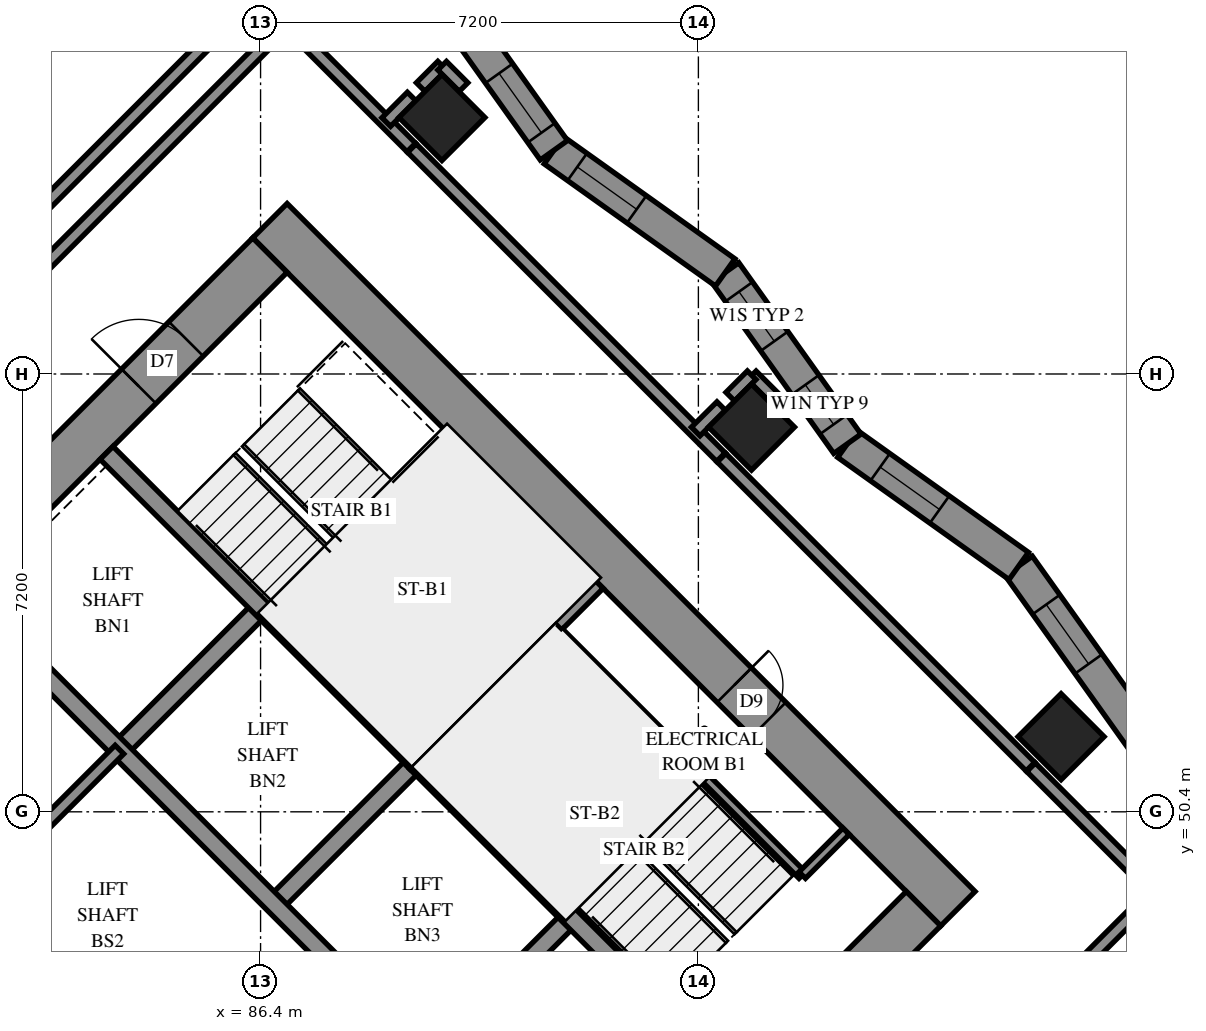
"""IFC4 building model, lengths in metres.
Left out: names, types, materials, properties, quantities, classifications, styles, units other than length and angle.
Written with IfcOpenShell. Run it as: python <this file> out.ifc"""

import sys

from ifc_helpers import new_model, si_unit, direction, frame, frame_2d, origin, origin_2d, place, context, subcontext, project, spatial, polyline, rectangle, outline, extrude, element, fill, save


model = new_model("IFC4")
c1 = context("Model", 3, precision=1e-05, world=origin(), true_north=direction((0.0, 1.0)))
c2 = subcontext(c1, "Body", "Model", "MODEL_VIEW")
j1 = project(units=[si_unit("LENGTHUNIT", "METRE"), si_unit("PLANEANGLEUNIT", "RADIAN")], contexts=[c1])
p1 = place(None, origin())
s1 = spatial("IfcSite", under=j1, at=p1, CompositionType="ELEMENT")
p2 = place(p1, origin())
s2 = spatial("IfcBuilding", under=s1, at=p2, CompositionType="ELEMENT")
p3 = place(p2, frame((0.0, 0.0, 111.8)))
s3 = spatial("IfcBuildingStorey", under=s2, at=p3, CompositionType="ELEMENT", Elevation=111.8)
for number, where, z_axis, x_axis in (
    (1, (89.382, 61.818, 0.0), (0.0, 0.0, 1.0), (0.707, -0.707, 0.0)),
    (2, (94.474, 56.727, 0.0), (0.0, 0.0, 1.0), (0.707, -0.707, 0.0)),
    (3, (99.565, 51.635, 0.0), (0.0, 0.0, 1.0), (0.707, -0.707, 0.0)),
):
    element("IfcColumn", number, at=place(p3, frame(where, z_axis=z_axis, x_axis=x_axis)), inside=s3, PredefinedType="COLUMN", context=c2, shape_type="SweptSolid", body=[
        extrude(rectangle(XDim=1.0, YDim=1.0, at=origin_2d()), origin(), (0.0, 0.0, 1.0), 3.1),
    ])
p4 = place(p3, frame((75.806, 49.373, -0.3), z_axis=(0.0, 0.0, 1.0), x_axis=(0.7071067812, -0.7071067812, 0.0)))
e4 = element("IfcWall", 4, at=p4, inside=s3, PredefinedType="SHEAR", context=c2, shape_type="SweptSolid", body=[
    extrude(rectangle(XDim=16.0, YDim=0.8, at=frame_2d((8.0, 0.0))), origin(), (0.0, 0.0, 1.0), 2.7),
])
p5 = place(p3, frame((86.554, 60.121, -0.3), z_axis=(0.0, 0.0, 1.0), x_axis=(0.7071067812, -0.7071067812, 0.0)))
e5 = element("IfcWall", 5, at=p5, inside=s3, PredefinedType="SHEAR", context=c2, shape_type="SweptSolid", body=[
    extrude(rectangle(XDim=16.0, YDim=0.8, at=frame_2d((8.0, 0.0))), origin(), (0.0, 0.0, 1.0), 2.7),
])
p6 = place(p5, frame((10.8, 0.0, 0.3)))
e6 = element("IfcOpeningElement", 6, at=p6, cuts=e5, PredefinedType="OPENING", context=c2, shape_type="SweptSolid", body=[
    extrude(rectangle(XDim=0.8, YDim=2.1, at=frame_2d((0.4, 1.05))), frame((0.0, 0.41, 0.0), z_axis=(0.0, -1.0, 0.0), x_axis=(1.0, 0.0, 0.0)), (0.0, 0.0, 1.0), 0.82),
])
p7 = place(p3, frame((76.372, 49.373, -0.3), z_axis=(0.0, 0.0, 1.0), x_axis=(0.7071067812, 0.7071067812, 0.0)))
e7 = element("IfcWall", 7, at=p7, inside=s3, PredefinedType="SHEAR", context=c2, shape_type="SweptSolid", body=[
    extrude(rectangle(XDim=14.4, YDim=0.8, at=frame_2d((7.2, 0.0))), origin(), (0.0, 0.0, 1.0), 2.7),
])
p8 = place(p7, frame((4.55, 0.0, 0.3)))
e8 = element("IfcOpeningElement", 8, at=p8, cuts=e7, PredefinedType="OPENING", context=c2, shape_type="SweptSolid", body=[
    extrude(rectangle(XDim=1.1, YDim=2.1, at=frame_2d((0.55, 1.05))), frame((0.0, 0.41, 0.0), z_axis=(0.0, -1.0, 0.0), x_axis=(1.0, 0.0, 0.0)), (0.0, 0.0, 1.0), 0.82),
])
p9 = place(p7, frame((11.35, 0.0, 0.3)))
e9 = element("IfcOpeningElement", 9, at=p9, cuts=e7, PredefinedType="OPENING", context=c2, shape_type="SweptSolid", body=[
    extrude(rectangle(XDim=1.1, YDim=2.1, at=frame_2d((0.55, 1.05))), frame((0.0, 0.41, 0.0), z_axis=(0.0, -1.0, 0.0), x_axis=(1.0, 0.0, 0.0)), (0.0, 0.0, 1.0), 0.82),
])
p10 = place(p3, frame((87.12, 38.625, -0.3), z_axis=(0.0, 0.0, 1.0), x_axis=(0.7071067812, 0.7071067812, 0.0)))
e10 = element("IfcWall", 10, at=p10, inside=s3, PredefinedType="SHEAR", context=c2, shape_type="SweptSolid", body=[
    extrude(rectangle(XDim=14.4, YDim=0.8, at=frame_2d((7.2, 0.0))), origin(), (0.0, 0.0, 1.0), 2.7),
])
p11 = place(p10, frame((4.55, 0.0, 0.3)))
e11 = element("IfcOpeningElement", 11, at=p11, cuts=e10, PredefinedType="OPENING", context=c2, shape_type="SweptSolid", body=[
    extrude(rectangle(XDim=1.1, YDim=2.1, at=frame_2d((0.55, 1.05))), frame((0.0, 0.41, 0.0), z_axis=(0.0, -1.0, 0.0), x_axis=(1.0, 0.0, 0.0)), (0.0, 0.0, 1.0), 0.82),
])
p12 = place(p10, frame((11.35, 0.0, 0.3)))
e12 = element("IfcOpeningElement", 12, at=p12, cuts=e10, PredefinedType="OPENING", context=c2, shape_type="SweptSolid", body=[
    extrude(rectangle(XDim=1.1, YDim=2.1, at=frame_2d((0.55, 1.05))), frame((0.0, 0.41, 0.0), z_axis=(0.0, -1.0, 0.0), x_axis=(1.0, 0.0, 0.0)), (0.0, 0.0, 1.0), 0.82),
])
p13 = place(p3, frame((84.079, 51.423, 0.0), z_axis=(0.0, 0.0, 1.0), x_axis=(0.7071219326, 0.7070916295, 0.0)))
e13 = element("IfcWall", 13, at=p13, inside=s3, PredefinedType="SOLIDWALL", context=c2, shape_type="SweptSolid", body=[
    extrude(rectangle(XDim=3.3, YDim=0.3, at=frame_2d((1.65, 0.0))), origin(), (0.0, 0.0, 1.0), 3.1),
])
for number, where, z_axis, x_axis in (
    (14, (86.625, 48.878, 0.0), (0.0, 0.0, 1.0), (0.707, 0.707, 0.0)),
    (15, (89.17, 46.332, 0.0), (0.0, 0.0, 1.0), (0.707, 0.707, 0.0)),
):
    element("IfcWall", number, at=place(p3, frame(where, z_axis=z_axis, x_axis=x_axis)), inside=s3, PredefinedType="SOLIDWALL", context=c2, shape_type="SweptSolid", body=[
        extrude(rectangle(XDim=3.3, YDim=0.3, at=frame_2d((1.65, 0.0))), origin(), (0.0, 0.0, 1.0), 3.1),
    ])
p14 = place(p3, frame((78.988, 51.423, 0.0), z_axis=(0.0, 0.0, 1.0), x_axis=(0.7071067812, -0.7071067812, 0.0)))
e16 = element("IfcWall", 16, at=p14, inside=s3, PredefinedType="SOLIDWALL", context=c2, shape_type="SweptSolid", body=[
    extrude(rectangle(XDim=14.4, YDim=0.3, at=frame_2d((7.2, 0.0))), origin(), (0.0, 0.0, 1.0), 3.1),
])
p15 = place(p14, frame((1.25, 0.0, 0.0)))
e17 = element("IfcOpeningElement", 17, at=p15, cuts=e16, PredefinedType="OPENING", context=c2, shape_type="SweptSolid", body=[
    extrude(rectangle(XDim=1.1, YDim=2.1, at=frame_2d((0.55, 1.05))), frame((0.0, 0.16, 0.0), z_axis=(0.0, -1.0, 0.0), x_axis=(1.0, 0.0, 0.0)), (0.0, 0.0, 1.0), 0.32),
])
p16 = place(p14, frame((4.85, 0.0, 0.0)))
e18 = element("IfcOpeningElement", 18, at=p16, cuts=e16, PredefinedType="OPENING", context=c2, shape_type="SweptSolid", body=[
    extrude(rectangle(XDim=1.1, YDim=2.1, at=frame_2d((0.55, 1.05))), frame((0.0, 0.16, 0.0), z_axis=(0.0, -1.0, 0.0), x_axis=(1.0, 0.0, 0.0)), (0.0, 0.0, 1.0), 0.32),
])
p17 = place(p14, frame((8.45, 0.0, 0.0)))
e19 = element("IfcOpeningElement", 19, at=p17, cuts=e16, PredefinedType="OPENING", context=c2, shape_type="SweptSolid", body=[
    extrude(rectangle(XDim=1.1, YDim=2.1, at=frame_2d((0.55, 1.05))), frame((0.0, 0.16, 0.0), z_axis=(0.0, -1.0, 0.0), x_axis=(1.0, 0.0, 0.0)), (0.0, 0.0, 1.0), 0.32),
])
p18 = place(p14, frame((12.05, 0.0, 0.0)))
e20 = element("IfcOpeningElement", 20, at=p18, cuts=e16, PredefinedType="OPENING", context=c2, shape_type="SweptSolid", body=[
    extrude(rectangle(XDim=1.1, YDim=2.1, at=frame_2d((0.55, 1.05))), frame((0.0, 0.16, 0.0), z_axis=(0.0, -1.0, 0.0), x_axis=(1.0, 0.0, 0.0)), (0.0, 0.0, 1.0), 0.32),
])
p19 = place(p3, frame((81.534, 53.969, 0.0), z_axis=(0.0, 0.0, 1.0), x_axis=(0.707103309, -0.7071102534, 0.0)))
e21 = element("IfcWall", 21, at=p19, inside=s3, PredefinedType="SOLIDWALL", context=c2, shape_type="SweptSolid", body=[
    extrude(rectangle(XDim=14.4, YDim=0.3, at=frame_2d((7.2, 0.0))), origin(), (0.0, 0.0, 1.0), 3.1),
])
p20 = place(p19, frame((12.05, 0.0, 0.0)))
e22 = element("IfcOpeningElement", 22, at=p20, cuts=e21, PredefinedType="OPENING", context=c2, shape_type="SweptSolid", body=[
    extrude(rectangle(XDim=1.1, YDim=2.1, at=frame_2d((0.55, 1.05))), frame((0.0, 0.16, 0.0), z_axis=(0.0, -1.0, 0.0), x_axis=(1.0, 0.0, 0.0)), (0.0, 0.0, 1.0), 0.32),
])
for number, where, z_axis, x_axis in (
    (23, (83.867, 56.302, 0.0), (0.0, 0.0, 1.0), (0.707, -0.707, 0.0)),
    (24, (88.958, 51.211, 0.0), (0.0, 0.0, 1.0), (0.707, -0.707, 0.0)),
):
    element("IfcWall", number, at=place(p3, frame(where, z_axis=z_axis, x_axis=x_axis)), inside=s3, PredefinedType="SOLIDWALL", context=c2, shape_type="SweptSolid", body=[
        extrude(rectangle(XDim=7.2, YDim=0.3, at=frame_2d((3.6, 0.0))), origin(), (0.0, 0.0, 1.0), 3.1),
    ])
p21 = place(p3, frame((88.958, 51.211, 0.0), z_axis=(0.0, 0.0, 1.0), x_axis=(0.7071067812, 0.7071067812, 0.0)))
e25 = element("IfcWall", 25, at=p21, inside=s3, PredefinedType="SOLIDWALL", context=c2, shape_type="SweptSolid", body=[
    extrude(rectangle(XDim=4.2, YDim=0.3, at=frame_2d((2.1, 0.0))), origin(), (0.0, 0.0, 1.0), 3.1),
])
p22 = place(p3, frame((100.877, 51.626, 0.0), z_axis=(0.0, 0.0, 1.0), x_axis=(-0.5805272785, 0.8142407991, 0.0)))
e26 = element("IfcWall", 26, at=p22, inside=s3, PredefinedType="SOLIDWALL", context=c2, shape_type="SweptSolid", body=[
    extrude(outline(polyline([(0.046, -0.275), (3.507, -0.275), (3.414, 0.275), (-0.046, 0.275), (0.046, -0.275)])), origin(), (0.0, 0.0, 1.0), 3.1),
])
p23 = place(p22, frame((1.481, 0.0, 0.5)))
e27 = element("IfcOpeningElement", 27, at=p23, cuts=e26, PredefinedType="OPENING", context=c2, shape_type="SweptSolid", body=[
    extrude(rectangle(XDim=1.2, YDim=2.45, at=frame_2d((0.6, 1.225))), frame((0.0, 0.285, 0.0), z_axis=(0.0, -1.0, 0.0), x_axis=(1.0, 0.0, 0.0)), (0.0, 0.0, 1.0), 0.57),
])
p24 = place(p3, frame((98.868, 54.444, 0.0), z_axis=(0.0, 0.0, 1.0), x_axis=(-0.8142544581, 0.5805081201, 0.0)))
e28 = element("IfcWall", 28, at=p24, inside=s3, PredefinedType="SOLIDWALL", context=c2, shape_type="SweptSolid", body=[
    extrude(outline(polyline([(-0.046, -0.275), (3.414, -0.275), (3.507, 0.275), (0.046, 0.275), (-0.046, -0.275)])), origin(), (0.0, 0.0, 1.0), 3.1),
])
p25 = place(p24, frame((1.599, 0.0, 0.5)))
e29 = element("IfcOpeningElement", 29, at=p25, cuts=e28, PredefinedType="OPENING", context=c2, shape_type="SweptSolid", body=[
    extrude(rectangle(XDim=1.2, YDim=2.45, at=frame_2d((0.6, 1.225))), frame((0.0, 0.285, 0.0), z_axis=(0.0, -1.0, 0.0), x_axis=(1.0, 0.0, 0.0)), (0.0, 0.0, 1.0), 0.57),
])
p26 = place(p3, frame((96.05, 56.452, 0.0), z_axis=(0.0, 0.0, 1.0), x_axis=(-0.5804944614, 0.8142641957, 0.0)))
e30 = element("IfcWall", 30, at=p26, inside=s3, PredefinedType="SOLIDWALL", context=c2, shape_type="SweptSolid", body=[
    extrude(outline(polyline([(0.046, -0.275), (3.507, -0.275), (3.414, 0.275), (-0.046, 0.275), (0.046, -0.275)])), origin(), (0.0, 0.0, 1.0), 3.1),
])
p27 = place(p26, frame((0.391, 0.0, 0.45)))
e31 = element("IfcOpeningElement", 31, at=p27, cuts=e30, PredefinedType="OPENING", context=c2, shape_type="SweptSolid", body=[
    extrude(rectangle(XDim=0.8, YDim=2.5, at=frame_2d((0.4, 1.25))), frame((0.0, 0.285, 0.0), z_axis=(0.0, -1.0, 0.0), x_axis=(1.0, 0.0, 0.0)), (0.0, 0.0, 1.0), 0.57),
])
p28 = place(p26, frame((2.071, 0.0, 0.45)))
e32 = element("IfcOpeningElement", 32, at=p28, cuts=e30, PredefinedType="OPENING", context=c2, shape_type="SweptSolid", body=[
    extrude(rectangle(XDim=1.0, YDim=2.5, at=frame_2d((0.5, 1.25))), frame((0.0, 0.285, 0.0), z_axis=(0.0, -1.0, 0.0), x_axis=(1.0, 0.0, 0.0)), (0.0, 0.0, 1.0), 0.57),
])
p29 = place(p3, frame((94.041, 59.27, 0.0), z_axis=(0.0, 0.0, 1.0), x_axis=(-0.8142641957, 0.5804944614, 0.0)))
e33 = element("IfcWall", 33, at=p29, inside=s3, PredefinedType="SOLIDWALL", context=c2, shape_type="SweptSolid", body=[
    extrude(outline(polyline([(-0.046, -0.275), (3.414, -0.275), (3.507, 0.275), (0.046, 0.275), (-0.046, -0.275)])), origin(), (0.0, 0.0, 1.0), 3.1),
])
p30 = place(p29, frame((1.789, 0.0, 0.5)))
e34 = element("IfcOpeningElement", 34, at=p30, cuts=e33, PredefinedType="OPENING", context=c2, shape_type="SweptSolid", body=[
    extrude(rectangle(XDim=1.2, YDim=2.45, at=frame_2d((0.6, 1.225))), frame((0.0, 0.285, 0.0), z_axis=(0.0, -1.0, 0.0), x_axis=(1.0, 0.0, 0.0)), (0.0, 0.0, 1.0), 0.57),
])
p31 = place(p3, frame((91.224, 61.279, 0.0), z_axis=(0.0, 0.0, 1.0), x_axis=(-0.5805081201, 0.8142544581, 0.0)))
e35 = element("IfcWall", 35, at=p31, inside=s3, PredefinedType="SOLIDWALL", context=c2, shape_type="SweptSolid", body=[
    extrude(outline(polyline([(0.046, -0.275), (3.507, -0.275), (3.414, 0.275), (-0.046, 0.275), (0.046, -0.275)])), origin(), (0.0, 0.0, 1.0), 3.1),
])
p32 = place(p31, frame((0.353, 0.0, 0.5)))
e36 = element("IfcOpeningElement", 36, at=p32, cuts=e35, PredefinedType="OPENING", context=c2, shape_type="SweptSolid", body=[
    extrude(rectangle(XDim=1.2, YDim=2.45, at=frame_2d((0.6, 1.225))), frame((0.0, 0.285, 0.0), z_axis=(0.0, -1.0, 0.0), x_axis=(1.0, 0.0, 0.0)), (0.0, 0.0, 1.0), 0.57),
])
p33 = place(p31, frame((2.355, 0.0, 0.45)))
e37 = element("IfcOpeningElement", 37, at=p33, cuts=e35, PredefinedType="OPENING", context=c2, shape_type="SweptSolid", body=[
    extrude(rectangle(XDim=0.8, YDim=2.5, at=frame_2d((0.4, 1.25))), frame((0.0, 0.285, 0.0), z_axis=(0.0, -1.0, 0.0), x_axis=(1.0, 0.0, 0.0)), (0.0, 0.0, 1.0), 0.57),
])
p34 = place(p3, frame((91.313, 53.354, 0.0), z_axis=(0.0, 0.0, 1.0), x_axis=(0.7071067812, -0.7071067812, 0.0)))
e38 = element("IfcWall", 38, at=p34, inside=s3, PredefinedType="PARTITIONING", context=c2, shape_type="SweptSolid", body=[
    extrude(rectangle(XDim=5.65, YDim=0.15, at=frame_2d((2.825, 0.0))), origin(), (0.0, 0.0, 1.0), 3.1),
])
p35 = place(p3, frame((95.308, 49.358, 0.0), z_axis=(0.0, 0.0, 1.0), x_axis=(0.70705776, 0.707155799, 0.0)))
e39 = element("IfcWall", 39, at=p35, inside=s3, PredefinedType="PARTITIONING", context=c2, shape_type="SweptSolid", body=[
    extrude(rectangle(XDim=1.02, YDim=0.15, at=frame_2d((0.51, 0.0))), origin(), (0.0, 0.0, 1.0), 3.1),
])
p36 = place(p3, frame((81.534, 48.878, 0.0), z_axis=(0.0, 0.0, 1.0), x_axis=(0.707092892, 0.7071206701, 0.0)))
e40 = element("IfcWall", 40, at=p36, inside=s3, PredefinedType="PARTITIONING", context=c2, shape_type="SweptSolid", body=[
    extrude(rectangle(XDim=3.6, YDim=0.2, at=frame_2d((1.8, 0.0))), origin(), (0.0, 0.0, 1.0), 3.1),
])
p37 = place(p3, frame((80.949, 58.477, 0.0), z_axis=(0.0, 0.0, 1.0), x_axis=(0.7071122005, 0.7071013619, 0.0)))
e41 = element("IfcWall", 41, at=p37, inside=s3, PredefinedType="PARTITIONING", context=c2, shape_type="SweptSolid", body=[
    extrude(rectangle(XDim=9.226, YDim=0.2, at=frame_2d((4.613, 0.0))), origin(), (0.0, 0.0, 1.0), 3.1),
])
p38 = place(p3, frame((81.322, 57.858, 0.0), z_axis=(0.0, 0.0, 1.0), x_axis=(0.7069785544, 0.7072349848, 0.0)))
e42 = element("IfcWall", 42, at=p38, inside=s3, PredefinedType="PARTITIONING", context=c2, shape_type="SweptSolid", body=[
    extrude(rectangle(XDim=7.799, YDim=0.2, at=frame_2d((3.9, 0.0))), origin(), (0.0, 0.0, 1.0), 3.1),
])
p39 = place(p3, frame((95.606, 43.577, 0.0), z_axis=(0.0, 0.0, 1.0), x_axis=(0.7071067812, 0.7071067812, 0.0)))
e43 = element("IfcWall", 43, at=p39, inside=s3, PredefinedType="PARTITIONING", context=c2, shape_type="SweptSolid", body=[
    extrude(rectangle(XDim=7.798, YDim=0.2, at=frame_2d((3.899, 0.0))), origin(), (0.0, 0.0, 1.0), 3.1),
])
p40 = place(p3, frame((88.889, 61.315, 0.0), z_axis=(0.0, 0.0, 1.0), x_axis=(0.7071067812, -0.7071067812, 0.0)))
e44 = element("IfcWall", 44, at=p40, inside=s3, PredefinedType="PARTITIONING", context=c2, shape_type="SweptSolid", body=[
    extrude(rectangle(XDim=7.187, YDim=0.2, at=frame_2d((3.594, 0.0))), origin(), (0.0, 0.0, 1.0), 3.1),
])
p41 = place(p3, frame((93.981, 56.223, 0.0), z_axis=(0.0, 0.0, 1.0), x_axis=(0.7071067812, -0.7071067812, 0.0)))
e45 = element("IfcWall", 45, at=p41, inside=s3, PredefinedType="PARTITIONING", context=c2, shape_type="SweptSolid", body=[
    extrude(rectangle(XDim=7.184, YDim=0.2, at=frame_2d((3.592, 0.0))), origin(), (0.0, 0.0, 1.0), 3.1),
])
p42 = place(p3, frame((97.795, 44.777, 0.0), z_axis=(0.0, 0.0, 1.0), x_axis=(0.7071137356, 0.7070998267, 0.0)))
e46 = element("IfcWall", 46, at=p42, inside=s3, PredefinedType="PARTITIONING", context=c2, shape_type="SweptSolid", body=[
    extrude(rectangle(XDim=7.19, YDim=0.2, at=frame_2d((3.595, 0.0))), origin(), (0.0, 0.0, 1.0), 3.1),
])
for number, where, z_axis, x_axis in (
    (47, (86.833, 63.371, 0.0), (0.0, 0.0, 1.0), (0.707, -0.707, 0.0)),
    (48, (99.071, 51.133, 0.0), (0.0, 0.0, 1.0), (0.707, -0.707, 0.0)),
):
    element("IfcWall", number, at=place(p3, frame(where, z_axis=z_axis, x_axis=x_axis)), inside=s3, PredefinedType="PARTITIONING", context=c2, shape_type="SweptSolid", body=[
        extrude(rectangle(XDim=2.893, YDim=0.2, at=frame_2d((1.447, 0.0))), origin(), (0.0, 0.0, 1.0), 3.1),
    ])
for number, where, z_axis, x_axis in (
    (49, (93.556, 56.654, 0.0), (0.0, 0.0, 1.0), (0.709, 0.705, 0.0)),
    (50, (88.467, 61.743, 0.0), (0.0, 0.0, 1.0), (0.705, 0.709, 0.0)),
):
    element("IfcWall", number, at=place(p3, frame(where, z_axis=z_axis, x_axis=x_axis)), inside=s3, PredefinedType="PARTITIONING", context=c2, shape_type="SweptSolid", body=[
        extrude(rectangle(XDim=0.593, YDim=0.2, at=frame_2d((0.296, 0.0))), origin(), (0.0, 0.0, 1.0), 3.1),
    ])
for number, where, z_axis, x_axis in (
    (51, (94.478, 57.578, 0.0), (0.0, 0.0, 1.0), (0.707, -0.707, 0.0)),
    (52, (89.033, 62.319, 0.0), (0.0, 0.0, 1.0), (0.707, 0.707, 0.0)),
    (53, (89.386, 62.67, 0.0), (0.0, 0.0, 1.0), (0.707, -0.707, 0.0)),
    (54, (94.124, 57.228, 0.0), (0.0, 0.0, 1.0), (0.707, 0.707, 0.0)),
):
    element("IfcWall", number, at=place(p3, frame(where, z_axis=z_axis, x_axis=x_axis)), inside=s3, PredefinedType="PARTITIONING", context=c2, shape_type="SweptSolid", body=[
        extrude(rectangle(XDim=0.498, YDim=0.2, at=frame_2d((0.249, 0.0))), origin(), (0.0, 0.0, 1.0), 3.1),
    ])
p43 = place(p23, origin())
e55 = element("IfcWindow", 55, at=p43, inside=s3, PartitioningType="SINGLE_PANEL", PredefinedType="WINDOW", context=c2, shape_type="SweptSolid", body=[
    extrude(rectangle(XDim=1.2, YDim=2.45, at=frame_2d((0.6, 1.225))), frame((0.0, 0.155, 0.0), z_axis=(0.0, -1.0, 0.0), x_axis=(1.0, 0.0, 0.0)), (0.0, 0.0, 1.0), 0.06),
])
fill(e27, e55)
p44 = place(p25, origin())
e56 = element("IfcWindow", 56, at=p44, inside=s3, PartitioningType="SINGLE_PANEL", PredefinedType="WINDOW", context=c2, shape_type="SweptSolid", body=[
    extrude(rectangle(XDim=1.2, YDim=2.45, at=frame_2d((0.6, 1.225))), frame((0.0, 0.155, 0.0), z_axis=(0.0, -1.0, 0.0), x_axis=(1.0, 0.0, 0.0)), (0.0, 0.0, 1.0), 0.06),
])
fill(e29, e56)
p45 = place(p30, origin())
e57 = element("IfcWindow", 57, at=p45, inside=s3, PartitioningType="SINGLE_PANEL", PredefinedType="WINDOW", context=c2, shape_type="SweptSolid", body=[
    extrude(rectangle(XDim=1.2, YDim=2.45, at=frame_2d((0.6, 1.225))), frame((0.0, 0.155, 0.0), z_axis=(0.0, -1.0, 0.0), x_axis=(1.0, 0.0, 0.0)), (0.0, 0.0, 1.0), 0.06),
])
fill(e34, e57)
p46 = place(p32, origin())
e58 = element("IfcWindow", 58, at=p46, inside=s3, PartitioningType="SINGLE_PANEL", PredefinedType="WINDOW", context=c2, shape_type="SweptSolid", body=[
    extrude(rectangle(XDim=1.2, YDim=2.45, at=frame_2d((0.6, 1.225))), frame((0.0, 0.155, 0.0), z_axis=(0.0, -1.0, 0.0), x_axis=(1.0, 0.0, 0.0)), (0.0, 0.0, 1.0), 0.06),
])
fill(e36, e58)
p47 = place(p6, origin())
e59 = element("IfcDoor", 59, at=p47, inside=s3, OperationType="SINGLE_SWING_RIGHT", PredefinedType="DOOR", context=c2, shape_type="SweptSolid", body=[
    extrude(rectangle(XDim=0.8, YDim=2.1, at=frame_2d((0.4, 1.05))), frame((0.0, -0.34, 0.0), z_axis=(0.0, -1.0, 0.0), x_axis=(1.0, 0.0, 0.0)), (0.0, 0.0, 1.0), 0.05),
])
fill(e6, e59)
p48 = place(p9, origin())
e60 = element("IfcDoor", 60, at=p48, inside=s3, OperationType="SINGLE_SWING_LEFT", PredefinedType="DOOR", context=c2, shape_type="SweptSolid", body=[
    extrude(rectangle(XDim=1.1, YDim=2.1, at=frame_2d((0.55, 1.05))), frame((0.0, 0.025, 0.0), z_axis=(0.0, -1.0, 0.0), x_axis=(1.0, 0.0, 0.0)), (0.0, 0.0, 1.0), 0.05),
])
fill(e9, e60)
p49 = place(p27, origin())
e61 = element("IfcWindow", 61, at=p49, inside=s3, PartitioningType="SINGLE_PANEL", PredefinedType="WINDOW", context=c2, shape_type="SweptSolid", body=[
    extrude(rectangle(XDim=0.8, YDim=2.5, at=frame_2d((0.4, 1.25))), frame((0.0, 0.155, 0.0), z_axis=(0.0, -1.0, 0.0), x_axis=(1.0, 0.0, 0.0)), (0.0, 0.0, 1.0), 0.06),
])
fill(e31, e61)
p50 = place(p28, origin())
e62 = element("IfcWindow", 62, at=p50, inside=s3, PartitioningType="SINGLE_PANEL", PredefinedType="WINDOW", context=c2, shape_type="SweptSolid", body=[
    extrude(rectangle(XDim=1.0, YDim=2.5, at=frame_2d((0.5, 1.25))), frame((0.0, 0.155, 0.0), z_axis=(0.0, -1.0, 0.0), x_axis=(1.0, 0.0, 0.0)), (0.0, 0.0, 1.0), 0.06),
])
fill(e32, e62)
save(model, sys.argv[1])
